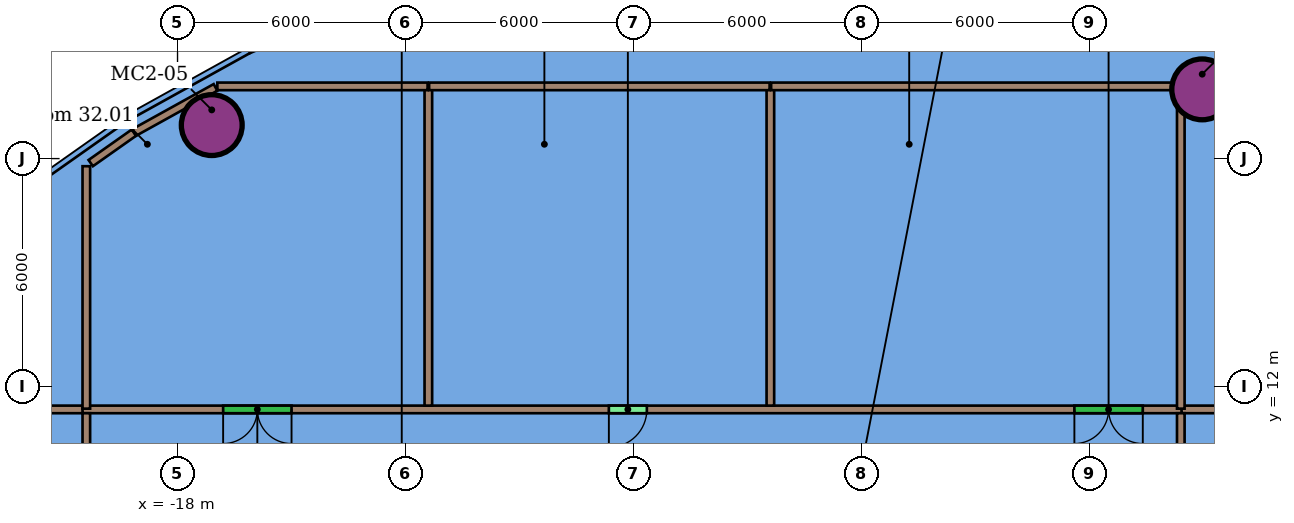
"""IFC4 building model, lengths in metres.
Left out: names, types, materials, properties, quantities, classifications, styles, units other than length and angle.
Written with IfcOpenShell. Run it as: python <this file> out.ifc"""

import sys

from ifc_helpers import new_model, si_unit, direction, frame, frame_2d, origin, origin_2d, place, context, subcontext, project, spatial, rectangle, hollow_circle, extrude, element, fill, save


model = new_model("IFC4")
c1 = context("Model", 3, precision=1e-05, world=origin(), true_north=direction((0.0, 1.0)))
c2 = subcontext(c1, "Body", "Model", "MODEL_VIEW")
j1 = project(units=[si_unit("LENGTHUNIT", "METRE"), si_unit("PLANEANGLEUNIT", "RADIAN")], contexts=[c1])
p1 = place(None, origin())
s1 = spatial("IfcSite", under=j1, at=p1, CompositionType="ELEMENT")
p2 = place(p1, origin())
s2 = spatial("IfcBuilding", under=s1, at=p2, CompositionType="ELEMENT")
p3 = place(p2, frame((0.0, 0.0, 135.4)))
s3 = spatial("IfcBuildingStorey", under=s2, at=p3, CompositionType="ELEMENT", Elevation=135.4)
for number, where, z_axis, x_axis in (
    (1, (8.963, 19.821, 0.0), (0.0, 0.0, 1.0), (1.0, 0.0, 0.0)),
    (2, (-17.1, 18.881, 0.0), (0.0, 0.0, 1.0), (1.0, 0.0, 0.0)),
):
    element("IfcColumn", number, at=place(p3, frame(where, z_axis=z_axis, x_axis=x_axis)), inside=s3, PredefinedType="COLUMN", context=c2, shape_type="SweptSolid", body=[
        extrude(hollow_circle(Radius=0.8, WallThickness=0.055, at=origin_2d()), origin(), (0.0, 0.0, 1.0), 7.85),
    ])
p4 = place(p3, frame((-27.306, 11.4, 0.0), z_axis=(0.0, 0.0, 1.0), x_axis=(1.0, 0.0, 0.0)))
e3 = element("IfcWall", 3, at=p4, inside=s3, PredefinedType="PARTITIONING", context=c2, shape_type="SweptSolid", body=[
    extrude(rectangle(XDim=6.886, YDim=0.2, at=frame_2d((3.443, 0.0))), origin(), (0.0, 0.0, 1.0), 7.262),
])
p5 = place(p3, frame((8.5, 11.4, 0.0), z_axis=(0.0, 0.0, 1.0), x_axis=(-1.0, 0.0, 0.0)))
e4 = element("IfcWall", 4, at=p5, inside=s3, PredefinedType="PARTITIONING", context=c2, shape_type="SweptSolid", body=[
    extrude(rectangle(XDim=29.0, YDim=0.2, at=frame_2d((14.5, 0.0))), origin(), (0.0, 0.0, 1.0), 7.262),
])
p6 = place(p5, frame((23.5, 0.0, 0.0)))
e5 = element("IfcOpeningElement", 5, at=p6, cuts=e4, PredefinedType="OPENING", context=c2, shape_type="SweptSolid", body=[
    extrude(rectangle(XDim=1.8, YDim=2.4, at=frame_2d((0.9, 1.2))), frame((0.0, 0.11, 0.0), z_axis=(0.0, -1.0, 0.0), x_axis=(1.0, 0.0, 0.0)), (0.0, 0.0, 1.0), 0.22),
])
p7 = place(p5, frame((14.15, 0.0, 0.0)))
e6 = element("IfcOpeningElement", 6, at=p7, cuts=e4, PredefinedType="OPENING", context=c2, shape_type="SweptSolid", body=[
    extrude(rectangle(XDim=1.0, YDim=2.1, at=frame_2d((0.5, 1.05))), frame((0.0, 0.11, 0.0), z_axis=(0.0, -1.0, 0.0), x_axis=(1.0, 0.0, 0.0)), (0.0, 0.0, 1.0), 0.22),
])
p8 = place(p5, frame((1.1, 0.0, 0.0)))
e7 = element("IfcOpeningElement", 7, at=p8, cuts=e4, PredefinedType="OPENING", context=c2, shape_type="SweptSolid", body=[
    extrude(rectangle(XDim=1.8, YDim=2.4, at=frame_2d((0.9, 1.2))), frame((0.0, 0.11, 0.0), z_axis=(0.0, -1.0, 0.0), x_axis=(1.0, 0.0, 0.0)), (0.0, 0.0, 1.0), 0.22),
])
p9 = place(p3, frame((8.42, 11.4, 0.0), z_axis=(0.0, 0.0, 1.0), x_axis=(1.0, 0.0, 0.0)))
e8 = element("IfcWall", 8, at=p9, inside=s3, PredefinedType="PARTITIONING", context=c2, shape_type="SweptSolid", body=[
    extrude(rectangle(XDim=8.38, YDim=0.2, at=frame_2d((4.19, 0.0))), origin(), (0.0, 0.0, 1.0), 7.262),
])
p10 = place(p3, frame((8.4, -11.3, 0.0), z_axis=(0.0, 0.0, 1.0), x_axis=(0.0, 1.0, 0.0)))
e9 = element("IfcWall", 9, at=p10, inside=s3, PredefinedType="PARTITIONING", context=c2, shape_type="SweptSolid", body=[
    extrude(rectangle(XDim=22.6, YDim=0.2, at=frame_2d((11.3, 0.0))), origin(), (0.0, 0.0, 1.0), 7.262),
])
p11 = place(p10, frame((10.4, 0.0, 0.0)))
e10 = element("IfcOpeningElement", 10, at=p11, cuts=e9, PredefinedType="OPENING", context=c2, shape_type="SweptSolid", body=[
    extrude(rectangle(XDim=1.8, YDim=2.4, at=frame_2d((0.9, 1.2))), frame((0.0, 0.11, 0.0), z_axis=(0.0, -1.0, 0.0), x_axis=(1.0, 0.0, 0.0)), (0.0, 0.0, 1.0), 0.22),
])
p12 = place(p3, frame((8.4, 11.42, 0.0), z_axis=(0.0, 0.0, 1.0), x_axis=(0.0, 1.0, 0.0)))
e11 = element("IfcWall", 11, at=p12, inside=s3, PredefinedType="PARTITIONING", context=c2, shape_type="SweptSolid", body=[
    extrude(rectangle(XDim=8.38, YDim=0.2, at=frame_2d((4.19, 0.0))), origin(), (0.0, 0.0, 1.0), 7.262),
])
p13 = place(p3, frame((-20.4, 11.3, 0.0), z_axis=(0.0, 0.0, 1.0), x_axis=(0.0, -1.0, 0.0)))
e12 = element("IfcWall", 12, at=p13, inside=s3, PredefinedType="PARTITIONING", context=c2, shape_type="SweptSolid", body=[
    extrude(rectangle(XDim=22.6, YDim=0.2, at=frame_2d((11.3, 0.0))), origin(), (0.0, 0.0, 1.0), 7.262),
])
p14 = place(p13, frame((15.7, 0.0, 0.0)))
e13 = element("IfcOpeningElement", 13, at=p14, cuts=e12, PredefinedType="OPENING", context=c2, shape_type="SweptSolid", body=[
    extrude(rectangle(XDim=1.8, YDim=2.4, at=frame_2d((0.9, 1.2))), frame((0.0, 0.11, 0.0), z_axis=(0.0, -1.0, 0.0), x_axis=(1.0, 0.0, 0.0)), (0.0, 0.0, 1.0), 0.22),
])
p15 = place(p13, frame((4.374, 0.0, 0.0)))
e14 = element("IfcOpeningElement", 14, at=p15, cuts=e12, PredefinedType="OPENING", context=c2, shape_type="SweptSolid", body=[
    extrude(rectangle(XDim=1.8, YDim=2.4, at=frame_2d((0.9, 1.2))), frame((0.0, 0.11, 0.0), z_axis=(0.0, -1.0, 0.0), x_axis=(1.0, 0.0, 0.0)), (0.0, 0.0, 1.0), 0.22),
])
p16 = place(p3, frame((-20.4, 11.42, 0.0), z_axis=(0.0, 0.0, 1.0), x_axis=(0.0, 1.0, 0.0)))
e15 = element("IfcWall", 15, at=p16, inside=s3, PredefinedType="PARTITIONING", context=c2, shape_type="SweptSolid", body=[
    extrude(rectangle(XDim=6.379, YDim=0.2, at=frame_2d((3.19, 0.0))), origin(), (0.0, 0.0, 1.0), 7.262),
])
for number, where, z_axis, x_axis in (
    (16, (-11.4, 11.5, 0.0), (0.0, 0.0, 1.0), (0.0, 1.0, 0.0)),
    (17, (-2.4, 11.5, 0.0), (0.0, 0.0, 1.0), (0.0, 1.0, 0.0)),
):
    element("IfcWall", number, at=place(p3, frame(where, z_axis=z_axis, x_axis=x_axis)), inside=s3, PredefinedType="PARTITIONING", context=c2, shape_type="SweptSolid", body=[
        extrude(rectangle(XDim=8.4, YDim=0.2, at=frame_2d((4.2, 0.0))), origin(), (0.0, 0.0, 1.0), 7.262),
    ])
p17 = place(p3, frame((-20.284, 17.881, 0.0), z_axis=(0.0, 0.0, 1.0), x_axis=(0.817328173214, 0.576172419741, 0.0)))
e18 = element("IfcWall", 18, at=p17, inside=s3, PredefinedType="PARTITIONING", context=c2, shape_type="SweptSolid", body=[
    extrude(rectangle(XDim=1.389, YDim=0.2, at=frame_2d((0.694, 0.0))), origin(), (0.0, 0.0, 1.0), 7.262),
])
p18 = place(p3, frame((-19.14, 18.688, 0.0), z_axis=(0.0, 0.0, 1.0), x_axis=(0.874698255776, 0.484667887673, 0.0)))
e19 = element("IfcWall", 19, at=p18, inside=s3, PredefinedType="PARTITIONING", context=c2, shape_type="SweptSolid", body=[
    extrude(rectangle(XDim=2.446, YDim=0.2, at=frame_2d((1.223, 0.0))), origin(), (0.0, 0.0, 1.0), 7.262),
])
p19 = place(p3, frame((-16.952, 19.9, 0.0), z_axis=(0.0, 0.0, 1.0), x_axis=(1.0, 0.0, 0.0)))
e20 = element("IfcWall", 20, at=p19, inside=s3, PredefinedType="PARTITIONING", context=c2, shape_type="SweptSolid", body=[
    extrude(rectangle(XDim=5.532, YDim=0.2, at=frame_2d((2.766, 0.0))), origin(), (0.0, 0.0, 1.0), 7.262),
])
p20 = place(p3, frame((-11.38, 19.9, 0.0), z_axis=(0.0, 0.0, 1.0), x_axis=(1.0, 0.0, 0.0)))
e21 = element("IfcWall", 21, at=p20, inside=s3, PredefinedType="PARTITIONING", context=c2, shape_type="SweptSolid", body=[
    extrude(rectangle(XDim=8.96, YDim=0.2, at=frame_2d((4.48, 0.0))), origin(), (0.0, 0.0, 1.0), 7.262),
])
p21 = place(p3, frame((-2.38, 19.9, 0.0), z_axis=(0.0, 0.0, 1.0), x_axis=(1.0, 0.0, 0.0)))
e22 = element("IfcWall", 22, at=p21, inside=s3, PredefinedType="PARTITIONING", context=c2, shape_type="SweptSolid", body=[
    extrude(rectangle(XDim=10.88, YDim=0.2, at=frame_2d((5.44, 0.0))), origin(), (0.0, 0.0, 1.0), 7.262),
])
p22 = place(p6, origin())
e23 = element("IfcDoor", 23, at=p22, inside=s3, OperationType="DOUBLE_DOOR_SINGLE_SWING", PredefinedType="DOOR", context=c2, shape_type="SweptSolid", body=[
    extrude(rectangle(XDim=1.8, YDim=2.4, at=frame_2d((0.9, 1.2))), frame((0.0, 0.025, 0.0), z_axis=(0.0, -1.0, 0.0), x_axis=(1.0, 0.0, 0.0)), (0.0, 0.0, 1.0), 0.05),
])
fill(e5, e23)
p23 = place(p7, origin())
e24 = element("IfcDoor", 24, at=p23, inside=s3, OperationType="SINGLE_SWING_RIGHT", PredefinedType="DOOR", context=c2, shape_type="SweptSolid", body=[
    extrude(rectangle(XDim=1.0, YDim=2.1, at=frame_2d((0.5, 1.05))), frame((0.0, 0.025, 0.0), z_axis=(0.0, -1.0, 0.0), x_axis=(1.0, 0.0, 0.0)), (0.0, 0.0, 1.0), 0.05),
])
fill(e6, e24)
p24 = place(p8, origin())
e25 = element("IfcDoor", 25, at=p24, inside=s3, OperationType="DOUBLE_DOOR_SINGLE_SWING", PredefinedType="DOOR", context=c2, shape_type="SweptSolid", body=[
    extrude(rectangle(XDim=1.8, YDim=2.4, at=frame_2d((0.9, 1.2))), frame((0.0, 0.025, 0.0), z_axis=(0.0, -1.0, 0.0), x_axis=(1.0, 0.0, 0.0)), (0.0, 0.0, 1.0), 0.05),
])
fill(e7, e25)
save(model, sys.argv[1])
